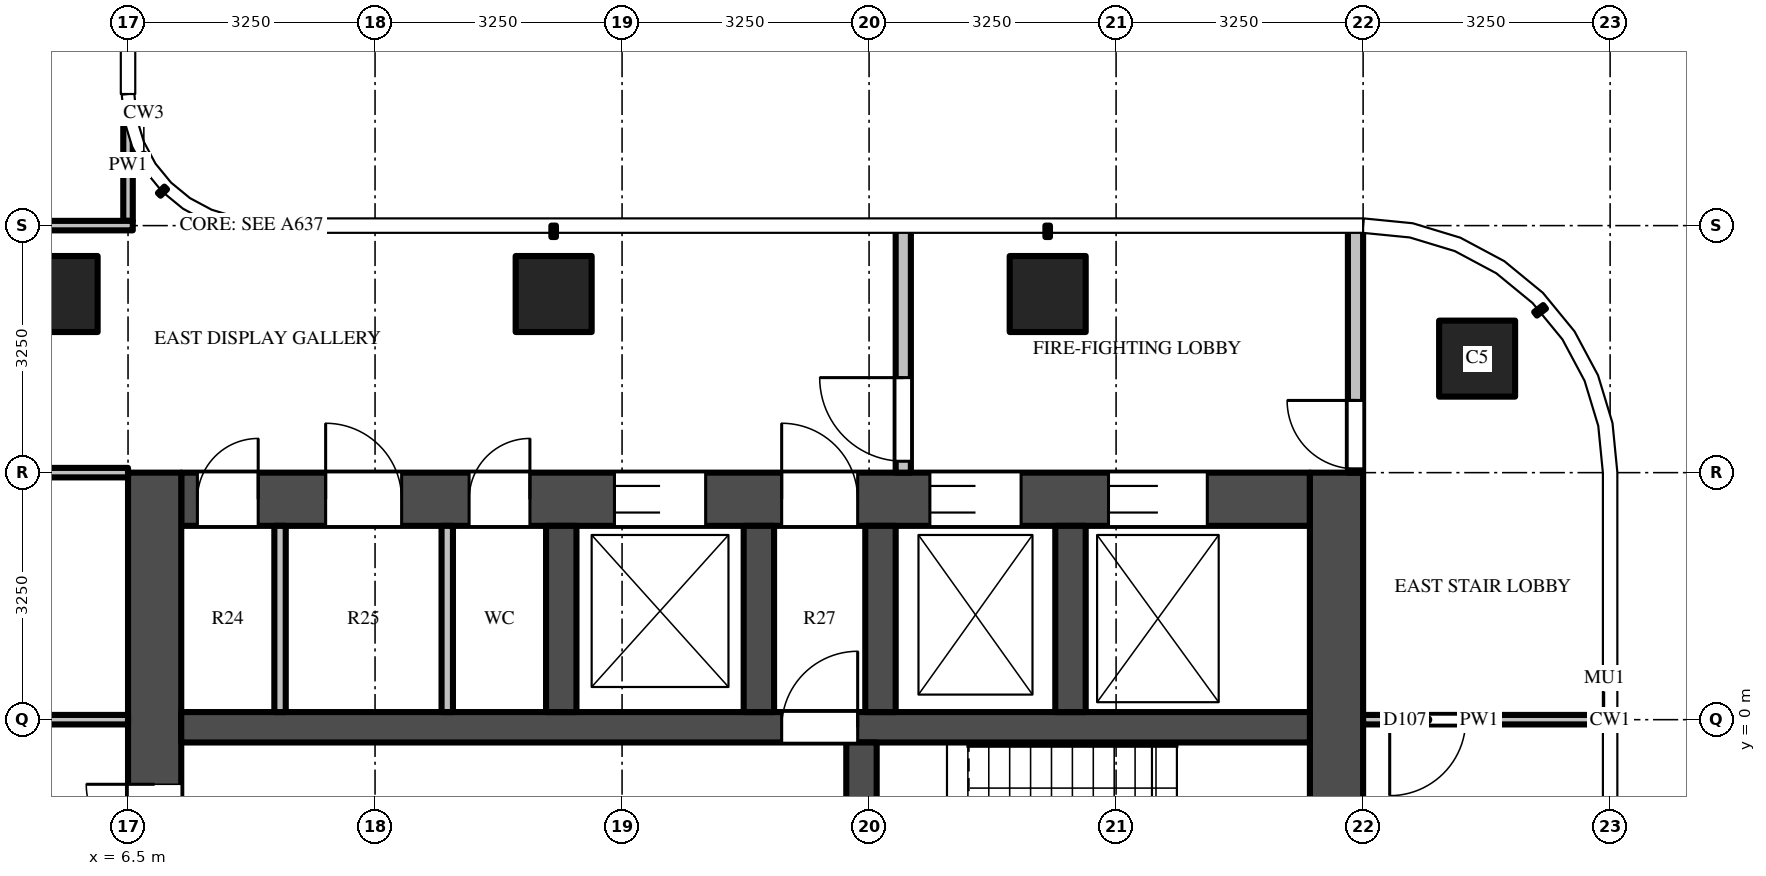
"""IFC4 building model, lengths in metres.
Left out: names, types, materials, properties, quantities, classifications, styles, units other than length and angle.
Written with IfcOpenShell. Run it as: python <this file> out.ifc"""

import sys

from ifc_helpers import new_model, si_unit, direction, frame, frame_2d, origin, origin_2d, place, context, subcontext, project, spatial, rectangle, extrude, source, transform, mapped, element, fill, save


model = new_model("IFC4")
c1 = context("Model", 3, precision=1e-05, world=origin(), true_north=direction((0.0, 1.0)))
c2 = subcontext(c1, "Body", "Model", "MODEL_VIEW")
j1 = project(units=[si_unit("LENGTHUNIT", "METRE"), si_unit("PLANEANGLEUNIT", "RADIAN")], contexts=[c1])
p1 = place(None, origin())
s1 = spatial("IfcSite", under=j1, at=p1, CompositionType="ELEMENT")
p2 = place(p1, origin())
s2 = spatial("IfcBuilding", under=s1, at=p2, CompositionType="ELEMENT")
p3 = place(p2, frame((0.0, 0.0, 291.1)))
s3 = spatial("IfcBuildingStorey", under=s2, at=p3, CompositionType="ELEMENT", Elevation=291.1)
m1 = source(origin(), c2, "Body", "SweptSolid", [
    extrude(rectangle(XDim=1.0, YDim=1.0, at=origin_2d()), origin(), (0.0, 0.0, 1.0), 3.9),
])
for number, where, z_axis, x_axis in (
    (1, (12.1, 5.6, 0.0), (0.0, 0.0, 1.0), (1.0, 0.0, 0.0)),
    (2, (18.6, 5.6, 0.0), (0.0, 0.0, 1.0), (1.0, 0.0, 0.0)),
    (3, (24.25, 4.75, 0.0), (0.0, 0.0, 1.0), (1.0, 0.0, 0.0)),
    (4, (5.6, 5.6, 0.0), (0.0, 0.0, 1.0), (1.0, 0.0, 0.0)),
):
    element("IfcColumn", number, at=place(p3, frame(where, z_axis=z_axis, x_axis=x_axis)), inside=s3, PredefinedType="COLUMN", context=c2, shape_type="MappedRepresentation", body=[
        mapped(m1, transform((0.0, 0.0, 0.0))),
    ])
m2 = source(origin(), c2, "Body", "SweptSolid", [
    extrude(rectangle(XDim=14.85, YDim=0.7, at=frame_2d((7.425, 0.0))), origin(), (0.0, 0.0, 1.0), 3.7),
])
p4 = place(p3, frame((7.2, 2.9, 0.0), z_axis=(0.0, 0.0, 1.0), x_axis=(1.0, 0.0, 0.0)))
e5 = element("IfcWall", 5, at=p4, inside=s3, PredefinedType="SHEAR", context=c2, shape_type="MappedRepresentation", body=[
    mapped(m2, transform((0.0, 0.0, 0.0))),
])
m3 = source(origin(), c2, "Body", "SweptSolid", [
    extrude(rectangle(XDim=1.2, YDim=2.1, at=frame_2d((0.6, 1.05))), frame((0.0, 0.36, 0.0), z_axis=(0.0, -1.0, 0.0), x_axis=(1.0, 0.0, 0.0)), (0.0, 0.0, 1.0), 0.72),
])
p5 = place(p4, frame((5.7, 0.0, 0.0)))
e6 = element("IfcOpeningElement", 6, at=p5, cuts=e5, PredefinedType="OPENING", context=c2, shape_type="MappedRepresentation", body=[
    mapped(m3, transform((0.0, 0.0, 0.0))),
])
m4 = source(origin(), c2, "Body", "SweptSolid", [
    extrude(rectangle(XDim=1.3, YDim=2.1, at=frame_2d((0.65, 1.05))), frame((0.0, 0.36, 0.0), z_axis=(0.0, -1.0, 0.0), x_axis=(1.0, 0.0, 0.0)), (0.0, 0.0, 1.0), 0.72),
])
p6 = place(p4, frame((12.2, 0.0, 0.0)))
e7 = element("IfcOpeningElement", 7, at=p6, cuts=e5, PredefinedType="OPENING", context=c2, shape_type="MappedRepresentation", body=[
    mapped(m4, transform((0.0, 0.0, 0.0))),
])
p7 = place(p4, frame((9.85, 0.0, 0.0)))
e8 = element("IfcOpeningElement", 8, at=p7, cuts=e5, PredefinedType="OPENING", context=c2, shape_type="MappedRepresentation", body=[
    mapped(m3, transform((0.0, 0.0, 0.0))),
])
m5 = source(origin(), c2, "Body", "SweptSolid", [
    extrude(rectangle(XDim=1.0, YDim=2.1, at=frame_2d((0.5, 1.05))), frame((0.0, 0.36, 0.0), z_axis=(0.0, -1.0, 0.0), x_axis=(1.0, 0.0, 0.0)), (0.0, 0.0, 1.0), 0.72),
])
p8 = place(p4, frame((7.9, 0.0, 0.0)))
e9 = element("IfcOpeningElement", 9, at=p8, cuts=e5, PredefinedType="OPENING", context=c2, shape_type="MappedRepresentation", body=[
    mapped(m5, transform((0.0, 0.0, 0.0))),
])
m6 = source(origin(), c2, "Body", "SweptSolid", [
    extrude(rectangle(XDim=0.8, YDim=2.1, at=frame_2d((0.4, 1.05))), frame((0.0, 0.36, 0.0), z_axis=(0.0, -1.0, 0.0), x_axis=(1.0, 0.0, 0.0)), (0.0, 0.0, 1.0), 0.72),
])
p9 = place(p4, frame((0.212, 0.0, 0.0)))
e10 = element("IfcOpeningElement", 10, at=p9, cuts=e5, PredefinedType="OPENING", context=c2, shape_type="MappedRepresentation", body=[
    mapped(m6, transform((0.0, 0.0, 0.0))),
])
p10 = place(p4, frame((1.9, 0.0, 0.0)))
e11 = element("IfcOpeningElement", 11, at=p10, cuts=e5, PredefinedType="OPENING", context=c2, shape_type="MappedRepresentation", body=[
    mapped(m5, transform((0.0, 0.0, 0.0))),
])
p11 = place(p4, frame((3.788, 0.0, 0.0)))
e12 = element("IfcOpeningElement", 12, at=p11, cuts=e5, PredefinedType="OPENING", context=c2, shape_type="MappedRepresentation", body=[
    mapped(m6, transform((0.0, 0.0, 0.0))),
])
m7 = source(origin(), c2, "Body", "SweptSolid", [
    extrude(rectangle(XDim=9.05, YDim=0.7, at=frame_2d((4.525, 0.0))), origin(), (0.0, 0.0, 1.0), 3.7),
])
p12 = place(p3, frame((6.85, -5.8, 0.0), z_axis=(0.0, 0.0, 1.0), x_axis=(0.0, 1.0, 0.0)))
e13 = element("IfcWall", 13, at=p12, inside=s3, PredefinedType="SHEAR", context=c2, shape_type="MappedRepresentation", body=[
    mapped(m7, transform((0.0, 0.0, 0.0))),
])
m8 = source(origin(), c2, "Body", "SweptSolid", [
    extrude(rectangle(XDim=1.8, YDim=2.1, at=frame_2d((0.9, 1.05))), frame((0.0, 0.36, 0.0), z_axis=(0.0, -1.0, 0.0), x_axis=(1.0, 0.0, 0.0)), (0.0, 0.0, 1.0), 0.72),
])
p13 = place(p12, frame((3.15, 0.0, 0.0)))
e14 = element("IfcOpeningElement", 14, at=p13, cuts=e13, PredefinedType="OPENING", context=c2, shape_type="MappedRepresentation", body=[
    mapped(m8, transform((0.0, 0.0, 0.0))),
])
p14 = place(p3, frame((22.4, -5.8, 0.0), z_axis=(0.0, 0.0, 1.0), x_axis=(0.0, 1.0, 0.0)))
e15 = element("IfcWall", 15, at=p14, inside=s3, PredefinedType="SHEAR", context=c2, shape_type="MappedRepresentation", body=[
    mapped(m7, transform((0.0, 0.0, 0.0))),
])
m9 = source(origin(), c2, "Body", "SweptSolid", [
    extrude(rectangle(XDim=14.85, YDim=0.4, at=frame_2d((7.425, 0.0))), origin(), (0.0, 0.0, 1.0), 3.7),
])
p15 = place(p3, frame((7.2, -0.1, 0.0), z_axis=(0.0, 0.0, 1.0), x_axis=(1.0, 0.0, 0.0)))
e16 = element("IfcWall", 16, at=p15, inside=s3, PredefinedType="SHEAR", context=c2, shape_type="MappedRepresentation", body=[
    mapped(m9, transform((0.0, 0.0, 0.0))),
])
m10 = source(origin(), c2, "Body", "SweptSolid", [
    extrude(rectangle(XDim=1.0, YDim=2.1, at=frame_2d((0.5, 1.05))), frame((0.0, 0.21, 0.0), z_axis=(0.0, -1.0, 0.0), x_axis=(1.0, 0.0, 0.0)), (0.0, 0.0, 1.0), 0.42),
])
p16 = place(p15, frame((7.9, 0.0, 0.0)))
e17 = element("IfcOpeningElement", 17, at=p16, cuts=e16, PredefinedType="OPENING", context=c2, shape_type="MappedRepresentation", body=[
    mapped(m10, transform((0.0, 0.0, 0.0))),
])
m11 = source(origin(), c2, "Body", "SweptSolid", [
    extrude(rectangle(XDim=5.5, YDim=0.4, at=frame_2d((2.75, 0.0))), origin(), (0.0, 0.0, 1.0), 3.7),
])
p17 = place(p3, frame((16.15, -5.8, 0.0), z_axis=(0.0, 0.0, 1.0), x_axis=(0.0, 1.0, 0.0)))
e18 = element("IfcWall", 18, at=p17, inside=s3, PredefinedType="SHEAR", context=c2, shape_type="MappedRepresentation", body=[
    mapped(m11, transform((0.0, 0.0, 0.0))),
])
m12 = source(origin(), c2, "Body", "SweptSolid", [
    extrude(rectangle(XDim=1.1, YDim=2.1, at=frame_2d((0.55, 1.05))), frame((0.0, 0.21, 0.0), z_axis=(0.0, -1.0, 0.0), x_axis=(1.0, 0.0, 0.0)), (0.0, 0.0, 1.0), 0.42),
])
p18 = place(p17, frame((0.725, 0.0, 0.0)))
e19 = element("IfcOpeningElement", 19, at=p18, cuts=e18, PredefinedType="OPENING", context=c2, shape_type="MappedRepresentation", body=[
    mapped(m12, transform((0.0, 0.0, 0.0))),
])
p19 = place(p17, frame((3.675, 0.0, 0.0)))
e20 = element("IfcOpeningElement", 20, at=p19, cuts=e18, PredefinedType="OPENING", context=c2, shape_type="MappedRepresentation", body=[
    mapped(m12, transform((0.0, 0.0, 0.0))),
])
m13 = source(origin(), c2, "Body", "SweptSolid", [
    extrude(rectangle(XDim=2.45, YDim=0.4, at=frame_2d((1.225, 0.0))), origin(), (0.0, 0.0, 1.0), 3.7),
])
for number, where, z_axis, x_axis in (
    (21, (12.2, 0.1, 0.0), (0.0, 0.0, 1.0), (0.0, 1.0, 0.0)),
    (22, (14.8, 0.1, 0.0), (0.0, 0.0, 1.0), (0.0, 1.0, 0.0)),
    (23, (16.4, 0.1, 0.0), (0.0, 0.0, 1.0), (0.0, 1.0, 0.0)),
    (24, (18.9, 0.1, 0.0), (0.0, 0.0, 1.0), (0.0, 1.0, 0.0)),
):
    element("IfcWall", number, at=place(p3, frame(where, z_axis=z_axis, x_axis=x_axis)), inside=s3, PredefinedType="SHEAR", context=c2, shape_type="MappedRepresentation", body=[
        mapped(m13, transform((0.0, 0.0, 0.0))),
    ])
m14 = source(origin(), c2, "Body", "SweptSolid", [
    extrude(rectangle(XDim=3.25, YDim=0.2, at=frame_2d((1.625, 0.0))), origin(), (0.0, 0.0, 1.0), 3.7),
])
p20 = place(p3, frame((16.7, 3.25, 0.0), z_axis=(0.0, 0.0, 1.0), x_axis=(0.0, 1.0, 0.0)))
e25 = element("IfcWall", 25, at=p20, inside=s3, PredefinedType="PARTITIONING", context=c2, shape_type="MappedRepresentation", body=[
    mapped(m14, transform((0.0, 0.0, 0.0))),
])
m15 = source(origin(), c2, "Body", "SweptSolid", [
    extrude(rectangle(XDim=1.1, YDim=2.1, at=frame_2d((0.55, 1.05))), frame((0.0, 0.11, 0.0), z_axis=(0.0, -1.0, 0.0), x_axis=(1.0, 0.0, 0.0)), (0.0, 0.0, 1.0), 0.22),
])
p21 = place(p20, frame((0.15, 0.0, 0.0)))
e26 = element("IfcOpeningElement", 26, at=p21, cuts=e25, PredefinedType="OPENING", context=c2, shape_type="MappedRepresentation", body=[
    mapped(m15, transform((0.0, 0.0, 0.0))),
])
p22 = place(p3, frame((22.65, 3.25, 0.0), z_axis=(0.0, 0.0, 1.0), x_axis=(0.0, 1.0, 0.0)))
e27 = element("IfcWall", 27, at=p22, inside=s3, PredefinedType="PARTITIONING", context=c2, shape_type="MappedRepresentation", body=[
    mapped(m14, transform((0.0, 0.0, 0.0))),
])
m16 = source(origin(), c2, "Body", "SweptSolid", [
    extrude(rectangle(XDim=0.9, YDim=2.1, at=frame_2d((0.45, 1.05))), frame((0.0, 0.11, 0.0), z_axis=(0.0, -1.0, 0.0), x_axis=(1.0, 0.0, 0.0)), (0.0, 0.0, 1.0), 0.22),
])
p23 = place(p22, frame((0.05, 0.0, 0.0)))
e28 = element("IfcOpeningElement", 28, at=p23, cuts=e27, PredefinedType="OPENING", context=c2, shape_type="MappedRepresentation", body=[
    mapped(m16, transform((0.0, 0.0, 0.0))),
])
m17 = source(origin(), c2, "Body", "SweptSolid", [
    extrude(rectangle(XDim=2.45, YDim=0.15, at=frame_2d((1.225, 0.0))), origin(), (0.0, 0.0, 1.0), 3.7),
])
for number, where, z_axis, x_axis in (
    (29, (8.5, 0.1, 0.0), (0.0, 0.0, 1.0), (0.0, 1.0, 0.0)),
    (30, (10.7, 0.1, 0.0), (0.0, 0.0, 1.0), (0.0, 1.0, 0.0)),
):
    element("IfcWall", number, at=place(p3, frame(where, z_axis=z_axis, x_axis=x_axis)), inside=s3, PredefinedType="PARTITIONING", context=c2, shape_type="MappedRepresentation", body=[
        mapped(m17, transform((0.0, 0.0, 0.0))),
    ])
m18 = source(origin(), c2, "Body", "SweptSolid", [
    extrude(rectangle(XDim=1.469, YDim=0.125, at=frame_2d((0.734, 0.0))), origin(), (0.0, 0.0, 1.0), 3.7),
])
p24 = place(p3, frame((6.5, 6.562, 0.0), z_axis=(0.0, 0.0, 1.0), x_axis=(0.0, 1.0, 0.0)))
e31 = element("IfcWall", 31, at=p24, inside=s3, PredefinedType="PARTITIONING", context=c2, shape_type="MappedRepresentation", body=[
    mapped(m18, transform((0.0, 0.0, 0.0))),
])
m19 = source(origin(), c2, "Body", "SweptSolid", [
    extrude(rectangle(XDim=5.363, YDim=0.125, at=frame_2d((2.681, 0.0))), origin(), (0.0, 0.0, 1.0), 2.997),
])
p25 = place(p3, frame((6.5, 0.0, 0.0), z_axis=(0.0, 0.0, 1.0), x_axis=(-1.0, 0.0, 0.0)))
e32 = element("IfcWall", 32, at=p25, inside=s3, PredefinedType="PARTITIONING", context=c2, shape_type="MappedRepresentation", body=[
    mapped(m19, transform((0.0, 0.0, 0.0))),
])
m20 = source(origin(), c2, "Body", "SweptSolid", [
    extrude(rectangle(XDim=1.0, YDim=2.1, at=frame_2d((0.5, 1.05))), frame((0.0, 0.073, 0.0), z_axis=(0.0, -1.0, 0.0), x_axis=(1.0, 0.0, 0.0)), (0.0, 0.0, 1.0), 0.145),
])
p26 = place(p25, frame((3.95, 0.0, 0.0)))
e33 = element("IfcOpeningElement", 33, at=p26, cuts=e32, PredefinedType="OPENING", context=c2, shape_type="MappedRepresentation", body=[
    mapped(m20, transform((0.0, 0.0, 0.0))),
])
m21 = source(origin(), c2, "Body", "SweptSolid", [
    extrude(rectangle(XDim=3.05, YDim=0.125, at=frame_2d((1.525, 0.0))), origin(), (0.0, 0.0, 1.0), 2.78),
])
p27 = place(p3, frame((25.8, 0.0, 0.0), z_axis=(0.0, 0.0, 1.0), x_axis=(-1.0, 0.0, 0.0)))
e34 = element("IfcWall", 34, at=p27, inside=s3, PredefinedType="PARTITIONING", context=c2, shape_type="MappedRepresentation", body=[
    mapped(m21, transform((0.0, 0.0, 0.0))),
])
p28 = place(p27, frame((1.7, 0.0, 0.0)))
e35 = element("IfcOpeningElement", 35, at=p28, cuts=e34, PredefinedType="OPENING", context=c2, shape_type="MappedRepresentation", body=[
    mapped(m20, transform((0.0, 0.0, 0.0))),
])
p29 = place(p3, frame((1.137, 3.25, 0.0), z_axis=(0.0, 0.0, 1.0), x_axis=(1.0, 0.0, 0.0)))
e36 = element("IfcWall", 36, at=p29, inside=s3, PredefinedType="PARTITIONING", context=c2, shape_type="MappedRepresentation", body=[
    mapped(m19, transform((0.0, 0.0, 0.0))),
])
m22 = source(origin(), c2, "Body", "SweptSolid", [
    extrude(rectangle(XDim=5.425, YDim=0.125, at=frame_2d((2.712, 0.0))), origin(), (0.0, 0.0, 1.0), 2.78),
])
p30 = place(p3, frame((1.137, 6.5, 0.0), z_axis=(0.0, 0.0, 1.0), x_axis=(1.0, 0.0, 0.0)))
e37 = element("IfcWall", 37, at=p30, inside=s3, PredefinedType="PARTITIONING", context=c2, shape_type="MappedRepresentation", body=[
    mapped(m22, transform((0.0, 0.0, 0.0))),
])
m23 = source(origin(), c2, "Body", "SweptSolid", [
    extrude(rectangle(XDim=1.2, YDim=2.1, at=frame_2d((0.6, 1.05))), frame((0.0, -0.275, 0.0), z_axis=(0.0, -1.0, 0.0), x_axis=(1.0, 0.0, 0.0)), (0.0, 0.0, 1.0), 0.05),
])
p31 = place(p5, origin())
e38 = element("IfcDoor", 38, at=p31, inside=s3, OperationType="DOUBLE_DOOR_SLIDING", PredefinedType="DOOR", context=c2, shape_type="MappedRepresentation", body=[
    mapped(m23, transform((0.0, 0.0, 0.0))),
])
fill(e6, e38)
m24 = source(origin(), c2, "Body", "SweptSolid", [
    extrude(rectangle(XDim=1.3, YDim=2.1, at=frame_2d((0.65, 1.05))), frame((0.0, -0.275, 0.0), z_axis=(0.0, -1.0, 0.0), x_axis=(1.0, 0.0, 0.0)), (0.0, 0.0, 1.0), 0.05),
])
p32 = place(p6, origin())
e39 = element("IfcDoor", 39, at=p32, inside=s3, OperationType="DOUBLE_DOOR_SLIDING", PredefinedType="DOOR", context=c2, shape_type="MappedRepresentation", body=[
    mapped(m24, transform((0.0, 0.0, 0.0))),
])
fill(e7, e39)
p33 = place(p7, origin())
e40 = element("IfcDoor", 40, at=p33, inside=s3, OperationType="DOUBLE_DOOR_SLIDING", PredefinedType="DOOR", context=c2, shape_type="MappedRepresentation", body=[
    mapped(m23, transform((0.0, 0.0, 0.0))),
])
fill(e8, e40)
m25 = source(origin(), c2, "Body", "SweptSolid", [
    extrude(rectangle(XDim=1.8, YDim=2.1, at=frame_2d((0.9, 1.05))), frame((0.0, -0.275, 0.0), z_axis=(0.0, -1.0, 0.0), x_axis=(1.0, 0.0, 0.0)), (0.0, 0.0, 1.0), 0.05),
])
p34 = place(p13, origin())
e41 = element("IfcDoor", 41, at=p34, inside=s3, OperationType="DOUBLE_DOOR_SINGLE_SWING", PredefinedType="DOOR", context=c2, shape_type="MappedRepresentation", body=[
    mapped(m25, transform((0.0, 0.0, 0.0))),
])
fill(e14, e41)
m26 = source(origin(), c2, "Body", "SweptSolid", [
    extrude(rectangle(XDim=1.0, YDim=2.1, at=frame_2d((0.5, 1.05))), frame((0.0, 0.025, 0.0), z_axis=(0.0, -1.0, 0.0), x_axis=(1.0, 0.0, 0.0)), (0.0, 0.0, 1.0), 0.05),
])
p35 = place(p16, origin())
e42 = element("IfcDoor", 42, at=p35, inside=s3, OperationType="SINGLE_SWING_RIGHT", PredefinedType="DOOR", context=c2, shape_type="MappedRepresentation", body=[
    mapped(m26, transform((0.0, 0.0, 0.0))),
])
fill(e17, e42)
m27 = source(origin(), c2, "Body", "SweptSolid", [
    extrude(rectangle(XDim=1.0, YDim=2.1, at=frame_2d((0.5, 1.05))), frame((0.0, -0.275, 0.0), z_axis=(0.0, -1.0, 0.0), x_axis=(1.0, 0.0, 0.0)), (0.0, 0.0, 1.0), 0.05),
])
p36 = place(p8, origin())
e43 = element("IfcDoor", 43, at=p36, inside=s3, OperationType="SINGLE_SWING_LEFT", PredefinedType="DOOR", context=c2, shape_type="MappedRepresentation", body=[
    mapped(m27, transform((0.0, 0.0, 0.0))),
])
fill(e9, e43)
m28 = source(origin(), c2, "Body", "SweptSolid", [
    extrude(rectangle(XDim=1.1, YDim=2.1, at=frame_2d((0.55, 1.05))), frame((0.0, 0.025, 0.0), z_axis=(0.0, -1.0, 0.0), x_axis=(1.0, 0.0, 0.0)), (0.0, 0.0, 1.0), 0.05),
])
p37 = place(p21, origin())
e44 = element("IfcDoor", 44, at=p37, inside=s3, OperationType="SINGLE_SWING_RIGHT", PredefinedType="DOOR", context=c2, shape_type="MappedRepresentation", body=[
    mapped(m28, transform((0.0, 0.0, 0.0))),
])
fill(e26, e44)
m29 = source(origin(), c2, "Body", "SweptSolid", [
    extrude(rectangle(XDim=0.9, YDim=2.1, at=frame_2d((0.45, 1.05))), frame((0.0, 0.025, 0.0), z_axis=(0.0, -1.0, 0.0), x_axis=(1.0, 0.0, 0.0)), (0.0, 0.0, 1.0), 0.05),
])
p38 = place(p23, origin())
e45 = element("IfcDoor", 45, at=p38, inside=s3, OperationType="SINGLE_SWING_RIGHT", PredefinedType="DOOR", context=c2, shape_type="MappedRepresentation", body=[
    mapped(m29, transform((0.0, 0.0, 0.0))),
])
fill(e28, e45)
m30 = source(origin(), c2, "Body", "SweptSolid", [
    extrude(rectangle(XDim=0.8, YDim=2.1, at=frame_2d((0.4, 1.05))), frame((0.0, -0.275, 0.0), z_axis=(0.0, -1.0, 0.0), x_axis=(1.0, 0.0, 0.0)), (0.0, 0.0, 1.0), 0.05),
])
p39 = place(p9, origin())
e46 = element("IfcDoor", 46, at=p39, inside=s3, OperationType="SINGLE_SWING_RIGHT", PredefinedType="DOOR", context=c2, shape_type="MappedRepresentation", body=[
    mapped(m30, transform((0.0, 0.0, 0.0))),
])
fill(e10, e46)
p40 = place(p10, origin())
e47 = element("IfcDoor", 47, at=p40, inside=s3, OperationType="SINGLE_SWING_LEFT", PredefinedType="DOOR", context=c2, shape_type="MappedRepresentation", body=[
    mapped(m27, transform((0.0, 0.0, 0.0))),
])
fill(e11, e47)
p41 = place(p11, origin())
e48 = element("IfcDoor", 48, at=p41, inside=s3, OperationType="SINGLE_SWING_RIGHT", PredefinedType="DOOR", context=c2, shape_type="MappedRepresentation", body=[
    mapped(m30, transform((0.0, 0.0, 0.0))),
])
fill(e12, e48)
p42 = place(p28, origin())
e49 = element("IfcDoor", 49, at=p42, inside=s3, OperationType="SINGLE_SWING_RIGHT", PredefinedType="DOOR", context=c2, shape_type="MappedRepresentation", body=[
    mapped(m26, transform((0.0, 0.0, 0.0))),
])
fill(e35, e49)
save(model, sys.argv[1])
